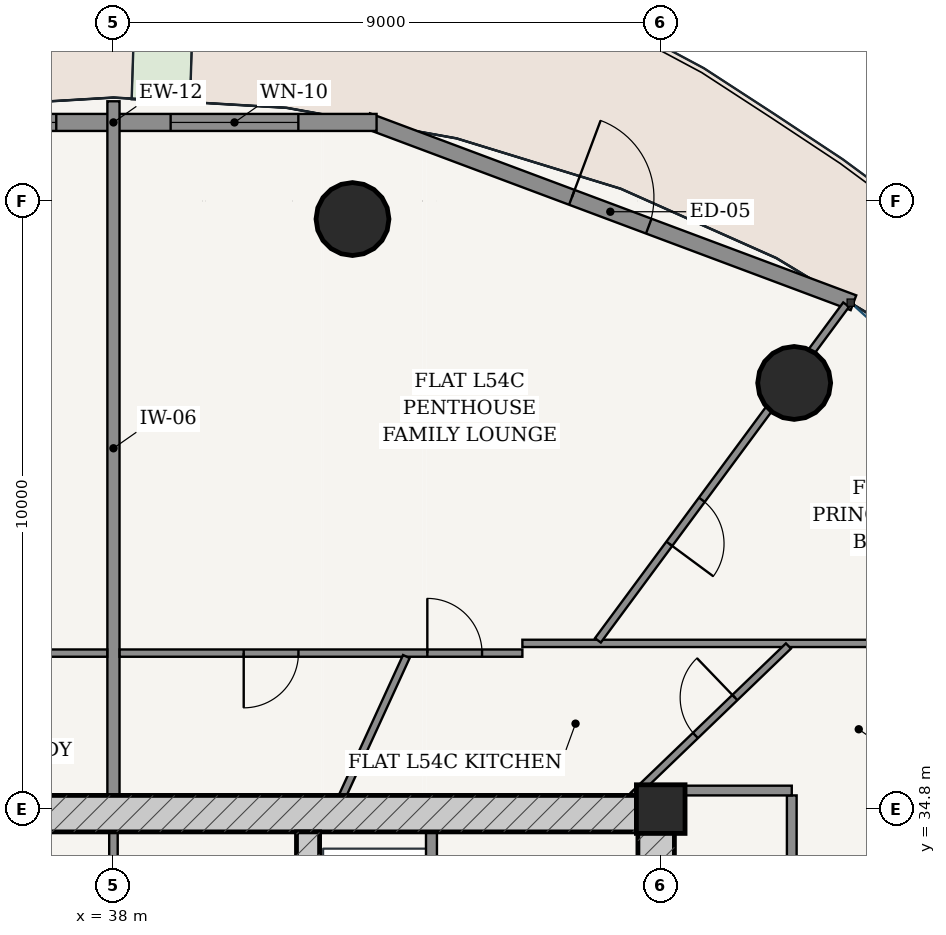
"""IFC4 building model, lengths in metres.
Left out: names, types, materials, properties, quantities, classifications, styles, units other than length and angle.
Written with IfcOpenShell. Run it as: python <this file> out.ifc"""

import sys

from ifc_helpers import new_model, si_unit, direction, frame, frame_2d, origin, origin_2d, place, context, subcontext, project, spatial, rectangle, hollow_circle, extrude, source, transform, mapped, element, fill, save


model = new_model("IFC4")
c1 = context("Model", 3, precision=1e-05, world=origin(), true_north=direction((-0.2419218956, 0.970295726276)))
c2 = subcontext(c1, "Body", "Model", "MODEL_VIEW")
j1 = project(units=[si_unit("LENGTHUNIT", "METRE"), si_unit("PLANEANGLEUNIT", "RADIAN")], contexts=[c1])
p1 = place(None, origin())
s1 = spatial("IfcSite", under=j1, at=p1, CompositionType="ELEMENT")
p2 = place(p1, origin())
s2 = spatial("IfcBuilding", under=s1, at=p2, CompositionType="ELEMENT")
p3 = place(p2, frame((0.0, 0.0, 206.0)))
s3 = spatial("IfcBuildingStorey", under=s2, at=p3, CompositionType="ELEMENT", Elevation=206.0)
p4 = place(p3, frame((47.0, 34.8, 0.0), z_axis=(0.0, 0.0, 1.0), x_axis=(1.0, 0.0, 0.0)))
e1 = element("IfcColumn", 1, at=p4, inside=s3, PredefinedType="COLUMN", context=c2, shape_type="SweptSolid", body=[
    extrude(rectangle(XDim=0.8, YDim=0.8, at=origin_2d()), origin(), (0.0, 0.0, 1.0), 3.7),
])
p5 = place(p3, frame((28.775, 34.725, 0.0), z_axis=(0.0, 0.0, 1.0), x_axis=(1.0, 0.0, 0.0)))
e2 = element("IfcWall", 2, at=p5, inside=s3, PredefinedType="SHEAR", context=c2, shape_type="SweptSolid", body=[
    extrude(rectangle(XDim=18.45, YDim=0.6, at=frame_2d((9.225, 0.0))), origin(), (0.0, 0.0, 1.0), 3.435),
])
p6 = place(p3, frame((46.925, 19.175, 0.0), z_axis=(0.0, 0.0, 1.0), x_axis=(0.0, 1.0, 0.0)))
e3 = element("IfcWall", 3, at=p6, inside=s3, PredefinedType="SHEAR", context=c2, shape_type="SweptSolid", body=[
    extrude(rectangle(XDim=15.25, YDim=0.6, at=frame_2d((7.625, 0.0))), origin(), (0.0, 0.0, 1.0), 3.435),
])
p7 = place(p6, frame((9.875, 0.0, 0.0)))
e4 = element("IfcOpeningElement", 4, at=p7, cuts=e3, PredefinedType="OPENING", context=c2, shape_type="SweptSolid", body=[
    extrude(rectangle(XDim=1.5, YDim=2.2, at=frame_2d((0.75, 1.1))), frame((0.0, 0.31, 0.0), z_axis=(0.0, -1.0, 0.0), x_axis=(1.0, 0.0, 0.0)), (0.0, 0.0, 1.0), 0.62),
])
p8 = place(p3, frame((41.2, 19.175, 0.0), z_axis=(0.0, 0.0, 1.0), x_axis=(0.0, 1.0, 0.0)))
e5 = element("IfcWall", 5, at=p8, inside=s3, PredefinedType="SHEAR", context=c2, shape_type="SweptSolid", body=[
    extrude(rectangle(XDim=15.25, YDim=0.38, at=frame_2d((7.625, 0.0))), origin(), (0.0, 0.0, 1.0), 3.435),
])
p9 = place(p8, frame((7.8, 0.0, 0.0)))
e6 = element("IfcOpeningElement", 6, at=p9, cuts=e5, PredefinedType="OPENING", context=c2, shape_type="SweptSolid", body=[
    extrude(rectangle(XDim=1.05, YDim=2.15, at=frame_2d((0.525, 1.075))), frame((0.0, 0.2, 0.0), z_axis=(0.0, -1.0, 0.0), x_axis=(1.0, 0.0, 0.0)), (0.0, 0.0, 1.0), 0.4),
])
for number, where, z_axis, x_axis in (
    (7, (49.195, 41.808, 0.0), (0.0, 0.0, 1.0), (1.0, 0.0, 0.0)),
    (8, (41.931, 44.503, 0.0), (0.0, 0.0, 1.0), (1.0, 0.0, 0.0)),
):
    element("IfcColumn", number, at=place(p3, frame(where, z_axis=z_axis, x_axis=x_axis)), inside=s3, PredefinedType="COLUMN", context=c2, shape_type="SweptSolid", body=[
        extrude(hollow_circle(Radius=0.6, WallThickness=0.038, at=origin_2d()), origin(), (0.0, 0.0, 1.0), 3.7),
    ])
p10 = place(p3, frame((50.17, 43.127, 0.0), z_axis=(0.0, 0.0, 1.0), x_axis=(-0.936556918375, 0.350515532672, 0.0)))
e9 = element("IfcWall", 9, at=p10, inside=s3, PredefinedType="SOLIDWALL", context=c2, shape_type="SweptSolid", body=[
    extrude(rectangle(XDim=8.539, YDim=0.26, at=frame_2d((4.27, 0.0))), origin(), (0.0, 0.0, 1.0), 3.435),
])
p11 = place(p10, frame((3.594, 0.0, 0.0)))
e10 = element("IfcOpeningElement", 10, at=p11, cuts=e9, PredefinedType="OPENING", context=c2, shape_type="SweptSolid", body=[
    extrude(rectangle(XDim=1.35, YDim=2.2, at=frame_2d((0.675, 1.1))), frame((0.0, 0.14, 0.0), z_axis=(0.0, -1.0, 0.0), x_axis=(1.0, 0.0, 0.0)), (0.0, 0.0, 1.0), 0.28),
])
p12 = place(p3, frame((42.327, 46.092, 0.0), z_axis=(0.0, 0.0, 1.0), x_axis=(-1.0, 0.0, 0.0)))
e11 = element("IfcWall", 11, at=p12, inside=s3, PredefinedType="SOLIDWALL", context=c2, shape_type="SweptSolid", body=[
    extrude(rectangle(XDim=8.654, YDim=0.28, at=frame_2d((4.327, 0.0))), origin(), (0.0, 0.0, 1.0), 3.435),
])
p13 = place(p12, frame((1.287, 0.0, 0.85)))
e12 = element("IfcOpeningElement", 12, at=p13, cuts=e11, PredefinedType="OPENING", context=c2, shape_type="SweptSolid", body=[
    extrude(rectangle(XDim=2.1, YDim=1.95, at=frame_2d((1.05, 0.975))), frame((0.0, 0.15, 0.0), z_axis=(0.0, -1.0, 0.0), x_axis=(1.0, 0.0, 0.0)), (0.0, 0.0, 1.0), 0.3),
])
p14 = place(p12, frame((5.268, 0.0, 0.85)))
e13 = element("IfcOpeningElement", 13, at=p14, cuts=e11, PredefinedType="OPENING", context=c2, shape_type="SweptSolid", body=[
    extrude(rectangle(XDim=2.1, YDim=1.95, at=frame_2d((1.05, 0.975))), frame((0.0, 0.15, 0.0), z_axis=(0.0, -1.0, 0.0), x_axis=(1.0, 0.0, 0.0)), (0.0, 0.0, 1.0), 0.3),
])
p15 = place(p3, frame((43.23, 28.52, 0.0), z_axis=(0.0, 0.0, 1.0), x_axis=(0.0, 1.0, 0.0)))
e14 = element("IfcWall", 14, at=p15, inside=s3, PredefinedType="PARTITIONING", context=c2, shape_type="SweptSolid", body=[
    extrude(rectangle(XDim=5.905, YDim=0.18, at=frame_2d((2.953, 0.0))), origin(), (0.0, 0.0, 1.0), 3.435),
])
p16 = place(p15, frame((0.905, 0.0, 0.0)))
e15 = element("IfcOpeningElement", 15, at=p16, cuts=e14, PredefinedType="OPENING", context=c2, shape_type="SweptSolid", body=[
    extrude(rectangle(XDim=0.85, YDim=2.1, at=frame_2d((0.425, 1.05))), frame((0.0, 0.1, 0.0), z_axis=(0.0, -1.0, 0.0), x_axis=(1.0, 0.0, 0.0)), (0.0, 0.0, 1.0), 0.2),
])
p17 = place(p15, frame((3.655, 0.0, 0.0)))
e16 = element("IfcOpeningElement", 16, at=p17, cuts=e14, PredefinedType="OPENING", context=c2, shape_type="SweptSolid", body=[
    extrude(rectangle(XDim=1.15, YDim=2.2, at=frame_2d((0.575, 1.1))), frame((0.0, 0.1, 0.0), z_axis=(0.0, -1.0, 0.0), x_axis=(1.0, 0.0, 0.0)), (0.0, 0.0, 1.0), 0.2),
])
p18 = place(p3, frame((38.0, 28.56, 0.0), z_axis=(0.0, 0.0, 1.0), x_axis=(0.0, 1.0, 0.0)))
e17 = element("IfcWall", 17, at=p18, inside=s3, PredefinedType="PARTITIONING", context=c2, shape_type="SweptSolid", body=[
    extrude(rectangle(XDim=5.865, YDim=0.14, at=frame_2d((2.933, 0.0))), origin(), (0.0, 0.0, 1.0), 3.435),
])
p19 = place(p3, frame((49.155, 16.725, 0.0), z_axis=(0.0, 0.0, 1.0), x_axis=(0.0, 1.0, 0.0)))
e18 = element("IfcWall", 18, at=p19, inside=s3, PredefinedType="PARTITIONING", context=c2, shape_type="SweptSolid", body=[
    extrude(rectangle(XDim=18.3, YDim=0.16, at=frame_2d((9.15, 0.0))), origin(), (0.0, 0.0, 1.0), 2.951),
])
p20 = place(p19, frame((15.302, 0.0, 0.0)))
e19 = element("IfcOpeningElement", 19, at=p20, cuts=e18, PredefinedType="OPENING", context=c2, shape_type="SweptSolid", body=[
    extrude(rectangle(XDim=0.98, YDim=2.2, at=frame_2d((0.49, 1.1))), frame((0.0, 0.09, 0.0), z_axis=(0.0, -1.0, 0.0), x_axis=(1.0, 0.0, 0.0)), (0.0, 0.0, 1.0), 0.18),
])
p21 = place(p3, frame((47.225, 35.105, 0.0), z_axis=(0.0, 0.0, 1.0), x_axis=(1.0, 0.0, 0.0)))
e20 = element("IfcWall", 20, at=p21, inside=s3, PredefinedType="PARTITIONING", context=c2, shape_type="SweptSolid", body=[
    extrude(rectangle(XDim=1.93, YDim=0.16, at=frame_2d((0.965, 0.0))), origin(), (0.0, 0.0, 1.0), 3.435),
])
p22 = place(p3, frame((38.0, 35.027, 0.0), z_axis=(0.0, 0.0, 1.0), x_axis=(0.0, 1.0, 0.0)))
e21 = element("IfcWall", 21, at=p22, inside=s3, PredefinedType="PARTITIONING", context=c2, shape_type="SweptSolid", body=[
    extrude(rectangle(XDim=11.413, YDim=0.2, at=frame_2d((5.707, 0.0))), origin(), (0.0, 0.0, 1.0), 2.52),
])
p23 = place(p3, frame((31.275, 37.365, 0.0), z_axis=(0.0, 0.0, 1.0), x_axis=(1.0, 0.0, 0.0)))
e22 = element("IfcWall", 22, at=p23, inside=s3, PredefinedType="PARTITIONING", context=c2, shape_type="SweptSolid", body=[
    extrude(rectangle(XDim=6.623, YDim=0.12, at=frame_2d((3.312, 0.0))), origin(), (0.0, 0.0, 1.0), 2.951),
])
p24 = place(p23, frame((4.413, 0.0, 0.0)))
e23 = element("IfcOpeningElement", 23, at=p24, cuts=e22, PredefinedType="OPENING", context=c2, shape_type="SweptSolid", body=[
    extrude(rectangle(XDim=0.86, YDim=2.15, at=frame_2d((0.43, 1.075))), frame((0.0, 0.07, 0.0), z_axis=(0.0, -1.0, 0.0), x_axis=(1.0, 0.0, 0.0)), (0.0, 0.0, 1.0), 0.14),
])
p25 = place(p23, frame((1.328, 0.0, 0.0)))
e24 = element("IfcOpeningElement", 24, at=p25, cuts=e22, PredefinedType="OPENING", context=c2, shape_type="SweptSolid", body=[
    extrude(rectangle(XDim=0.9, YDim=2.15, at=frame_2d((0.45, 1.075))), frame((0.0, 0.07, 0.0), z_axis=(0.0, -1.0, 0.0), x_axis=(1.0, 0.0, 0.0)), (0.0, 0.0, 1.0), 0.14),
])
p26 = place(p3, frame((38.102, 37.365, 0.0), z_axis=(0.0, 0.0, 1.0), x_axis=(1.0, 0.0, 0.0)))
e25 = element("IfcWall", 25, at=p26, inside=s3, PredefinedType="PARTITIONING", context=c2, shape_type="SweptSolid", body=[
    extrude(rectangle(XDim=6.623, YDim=0.12, at=frame_2d((3.312, 0.0))), origin(), (0.0, 0.0, 1.0), 2.951),
])
p27 = place(p26, frame((5.06, 0.0, 0.0)))
e26 = element("IfcOpeningElement", 26, at=p27, cuts=e25, PredefinedType="OPENING", context=c2, shape_type="SweptSolid", body=[
    extrude(rectangle(XDim=0.9, YDim=2.15, at=frame_2d((0.45, 1.075))), frame((0.0, 0.07, 0.0), z_axis=(0.0, -1.0, 0.0), x_axis=(1.0, 0.0, 0.0)), (0.0, 0.0, 1.0), 0.14),
])
p28 = place(p26, frame((2.04, 0.0, 0.0)))
e27 = element("IfcOpeningElement", 27, at=p28, cuts=e25, PredefinedType="OPENING", context=c2, shape_type="SweptSolid", body=[
    extrude(rectangle(XDim=0.9, YDim=2.15, at=frame_2d((0.45, 1.075))), frame((0.0, 0.07, 0.0), z_axis=(0.0, -1.0, 0.0), x_axis=(1.0, 0.0, 0.0)), (0.0, 0.0, 1.0), 0.14),
])
p29 = place(p3, frame((44.725, 37.525, 0.0), z_axis=(0.0, 0.0, 1.0), x_axis=(1.0, 0.0, 0.0)))
e28 = element("IfcWall", 28, at=p29, inside=s3, PredefinedType="PARTITIONING", context=c2, shape_type="SweptSolid", body=[
    extrude(rectangle(XDim=6.85, YDim=0.12, at=frame_2d((3.425, 0.0))), origin(), (0.0, 0.0, 1.0), 2.951),
])
p30 = place(p3, frame((45.967, 37.575, 0.0), z_axis=(0.0, 0.0, 1.0), x_axis=(0.59452500855, 0.804077119565, 0.0)))
e29 = element("IfcWall", 29, at=p30, inside=s3, PredefinedType="PARTITIONING", context=c2, shape_type="SweptSolid", body=[
    extrude(rectangle(XDim=6.867, YDim=0.12, at=frame_2d((3.434, 0.0))), origin(), (0.0, 0.0, 1.0), 2.951),
])
p31 = place(p30, frame((1.975, 0.0, 0.0)))
e30 = element("IfcOpeningElement", 30, at=p31, cuts=e29, PredefinedType="OPENING", context=c2, shape_type="SweptSolid", body=[
    extrude(rectangle(XDim=0.9, YDim=2.15, at=frame_2d((0.45, 1.075))), frame((0.0, 0.07, 0.0), z_axis=(0.0, -1.0, 0.0), x_axis=(1.0, 0.0, 0.0)), (0.0, 0.0, 1.0), 0.14),
])
p32 = place(p3, frame((46.549, 35.026, 0.0), z_axis=(0.0, 0.0, 1.0), x_axis=(0.720557461206, 0.693395230082, 0.0)))
e31 = element("IfcWall", 31, at=p32, inside=s3, PredefinedType="PARTITIONING", context=c2, shape_type="SweptSolid", body=[
    extrude(rectangle(XDim=3.541, YDim=0.12, at=frame_2d((1.771, 0.0))), origin(), (0.0, 0.0, 1.0), 2.951),
])
p33 = place(p32, frame((1.419, 0.0, 0.0)))
e32 = element("IfcOpeningElement", 32, at=p33, cuts=e31, PredefinedType="OPENING", context=c2, shape_type="SweptSolid", body=[
    extrude(rectangle(XDim=0.9, YDim=2.15, at=frame_2d((0.45, 1.075))), frame((0.0, 0.07, 0.0), z_axis=(0.0, -1.0, 0.0), x_axis=(1.0, 0.0, 0.0)), (0.0, 0.0, 1.0), 0.14),
])
p34 = place(p3, frame((41.771, 35.027, 0.0), z_axis=(0.0, 0.0, 1.0), x_axis=(0.416688202143, 0.909049471808, 0.0)))
e33 = element("IfcWall", 33, at=p34, inside=s3, PredefinedType="PARTITIONING", context=c2, shape_type="SweptSolid", body=[
    extrude(rectangle(XDim=2.51, YDim=0.12, at=frame_2d((1.255, 0.0))), origin(), (0.0, 0.0, 1.0), 3.435),
])
m1 = source(origin(), c2, "Body", "SweptSolid", [
    extrude(rectangle(XDim=1.35, YDim=2.2, at=frame_2d((0.675, 1.1))), frame((0.0, 0.025, 0.0), z_axis=(0.0, -1.0, 0.0), x_axis=(1.0, 0.0, 0.0)), (0.0, 0.0, 1.0), 0.05),
])
p35 = place(p11, frame((1.35, 0.0, 0.0), z_axis=(0.0, 0.0, 1.0), x_axis=(-1.0, 0.0, 0.0)))
e34 = element("IfcDoor", 34, at=p35, inside=s3, OperationType="SINGLE_SWING_LEFT", PredefinedType="DOOR", context=c2, shape_type="MappedRepresentation", body=[
    mapped(m1, transform((0.0, 0.0, 0.0), scale=1.0)),
])
fill(e10, e34)
m2 = source(origin(), c2, "Body", "SweptSolid", [
    extrude(rectangle(XDim=2.1, YDim=1.95, at=frame_2d((1.05, 0.975))), frame((0.0, 0.03, 0.0), z_axis=(0.0, -1.0, 0.0), x_axis=(1.0, 0.0, 0.0)), (0.0, 0.0, 1.0), 0.06),
])
p36 = place(p13, origin())
e35 = element("IfcWindow", 35, at=p36, inside=s3, PartitioningType="SINGLE_PANEL", PredefinedType="WINDOW", context=c2, shape_type="MappedRepresentation", body=[
    mapped(m2, transform((0.0, 0.0, 0.0), scale=1.0)),
])
fill(e12, e35)
p37 = place(p14, origin())
e36 = element("IfcWindow", 36, at=p37, inside=s3, PartitioningType="SINGLE_PANEL", PredefinedType="WINDOW", context=c2, shape_type="MappedRepresentation", body=[
    mapped(m2, transform((0.0, 0.0, 0.0), scale=1.0)),
])
fill(e13, e36)
m3 = source(origin(), c2, "Body", "SweptSolid", [
    extrude(rectangle(XDim=0.9, YDim=2.15, at=frame_2d((0.45, 1.075))), frame((0.0, 0.025, 0.0), z_axis=(0.0, -1.0, 0.0), x_axis=(1.0, 0.0, 0.0)), (0.0, 0.0, 1.0), 0.05),
])
p38 = place(p33, origin())
e37 = element("IfcDoor", 37, at=p38, inside=s3, OperationType="SINGLE_SWING_RIGHT", PredefinedType="DOOR", context=c2, shape_type="MappedRepresentation", body=[
    mapped(m3, transform((0.0, 0.0, 0.0), scale=1.0)),
])
fill(e32, e37)
p39 = place(p27, origin())
e38 = element("IfcDoor", 38, at=p39, inside=s3, OperationType="SINGLE_SWING_LEFT", PredefinedType="DOOR", context=c2, shape_type="MappedRepresentation", body=[
    mapped(m3, transform((0.0, 0.0, 0.0), scale=1.0)),
])
fill(e26, e38)
p40 = place(p28, frame((0.9, 0.0, 0.0), z_axis=(0.0, 0.0, 1.0), x_axis=(-1.0, 0.0, 0.0)))
e39 = element("IfcDoor", 39, at=p40, inside=s3, OperationType="SINGLE_SWING_RIGHT", PredefinedType="DOOR", context=c2, shape_type="MappedRepresentation", body=[
    mapped(m3, transform((0.0, 0.0, 0.0), scale=1.0)),
])
fill(e27, e39)
p41 = place(p31, frame((0.9, 0.0, 0.0), z_axis=(0.0, 0.0, 1.0), x_axis=(-1.0, 0.0, 0.0)))
e40 = element("IfcDoor", 40, at=p41, inside=s3, OperationType="SINGLE_SWING_RIGHT", PredefinedType="DOOR", context=c2, shape_type="MappedRepresentation", body=[
    mapped(m3, transform((0.0, 0.0, 0.0), scale=1.0)),
])
fill(e30, e40)
save(model, sys.argv[1])
